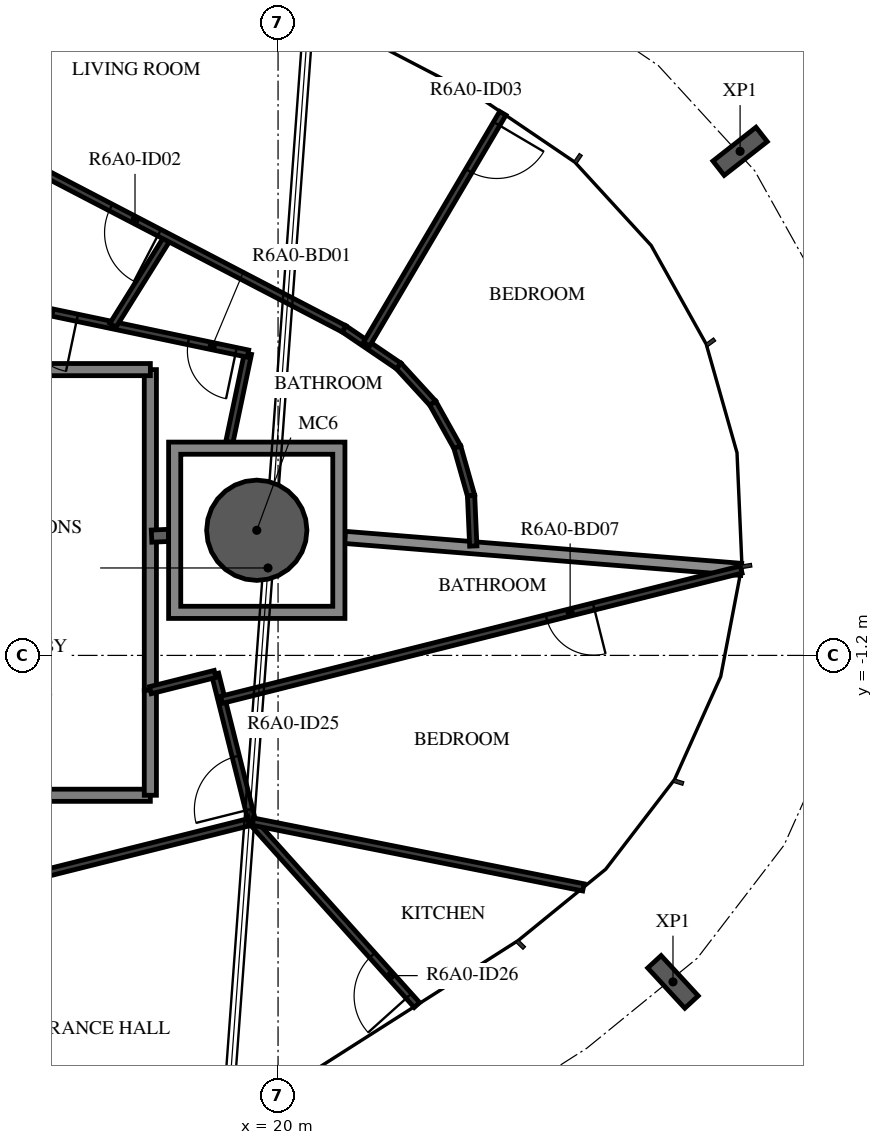
"""IFC4 building model, lengths in metres.
Left out: names, types, materials, properties, quantities, classifications, styles, units other than length and angle.
Written with IfcOpenShell. Run it as: python <this file> out.ifc"""

import sys

from ifc_helpers import new_model, si_unit, direction, frame, frame_2d, origin, origin_2d, place, context, subcontext, project, spatial, polyline, rectangle, hollow_circle, i_section, outline, extrude, element, fill, save


model = new_model("IFC4")
c1 = context("Model", 3, precision=1e-05, world=origin(), true_north=direction((0.0, 1.0)))
c2 = subcontext(c1, "Body", "Model", "MODEL_VIEW")
j1 = project(units=[si_unit("LENGTHUNIT", "METRE"), si_unit("PLANEANGLEUNIT", "RADIAN")], contexts=[c1])
p1 = place(None, origin())
s1 = spatial("IfcSite", under=j1, at=p1, CompositionType="ELEMENT")
p2 = place(p1, origin())
s2 = spatial("IfcBuilding", under=s1, at=p2, CompositionType="ELEMENT")
p3 = place(p2, frame((0.0, 0.0, 233.7)))
s3 = spatial("IfcBuildingStorey", under=s2, at=p3, CompositionType="ELEMENT", Elevation=233.7)
p4 = place(p3, frame((19.65, 0.858, -0.38), z_axis=(0.0, 0.0, 1.0), x_axis=(1.0, 0.0, 0.0)))
e1 = element("IfcColumn", 1, at=p4, inside=s3, PredefinedType="COLUMN", context=c2, shape_type="SweptSolid", body=[
    extrude(hollow_circle(Radius=0.825, WallThickness=0.04, at=origin_2d()), origin(), (0.0, 0.0, 1.0), 3.5),
])
for number, where, z_axis, x_axis in (
    (2, (26.495, -6.569, -0.38), (0.0, 0.0, 1.0), (-0.735, -0.678, 0.0)),
    (3, (27.598, 7.09, -0.38), (0.0, 0.0, 1.0), (0.617, -0.787, 0.0)),
):
    element("IfcColumn", number, at=place(p3, frame(where, z_axis=z_axis, x_axis=x_axis)), inside=s3, PredefinedType="COLUMN", context=c2, shape_type="SweptSolid", body=[
        extrude(i_section(OverallWidth=0.3, OverallDepth=0.9, WebThickness=0.019, FlangeThickness=0.035, FilletRadius=0.03, at=origin_2d()), origin(), (0.0, 0.0, 1.0), 3.5),
    ])
p5 = place(p3, frame((17.9, -1.772, 0.0), z_axis=(0.0, 0.0, 1.0), x_axis=(0.0, 1.0, 0.0)))
e4 = element("IfcWall", 4, at=p5, inside=s3, PredefinedType="STANDARD", context=c2, shape_type="SweptSolid", body=[
    extrude(rectangle(XDim=5.272, YDim=0.2, at=frame_2d((2.636, 0.0))), origin(), (0.0, 0.0, 1.0), 3.12),
])
p6 = place(p3, frame((17.9, 3.5, 0.0), z_axis=(0.0, 0.0, 1.0), x_axis=(-1.0, 0.0, 0.0)))
e5 = element("IfcWall", 5, at=p6, inside=s3, PredefinedType="STANDARD", context=c2, shape_type="SweptSolid", body=[
    extrude(rectangle(XDim=4.64, YDim=0.2, at=frame_2d((2.32, 0.0))), origin(), (0.0, 0.0, 1.0), 3.12),
])
p7 = place(p3, frame((13.285, -3.5, 0.0), z_axis=(0.0, 0.0, 1.0), x_axis=(1.0, 0.0, 0.0)))
e6 = element("IfcWall", 6, at=p7, inside=s3, PredefinedType="STANDARD", context=c2, shape_type="SweptSolid", body=[
    extrude(rectangle(XDim=4.615, YDim=0.2, at=frame_2d((2.308, 0.0))), origin(), (0.0, 0.0, 1.0), 3.12),
])
p8 = place(p3, frame((17.9, -3.5, 0.0), z_axis=(0.0, 0.0, 1.0), x_axis=(0.0, 1.0, 0.0)))
e7 = element("IfcWall", 7, at=p8, inside=s3, PredefinedType="STANDARD", context=c2, shape_type="SweptSolid", body=[
    extrude(rectangle(XDim=1.728, YDim=0.2, at=frame_2d((0.864, 0.0))), origin(), (0.0, 0.0, 1.0), 3.12),
])
p9 = place(p3, frame((17.92, 0.761, 0.0), z_axis=(0.0, 0.0, 1.0), x_axis=(0.999051221661, 0.04355061995, 0.0)))
e8 = element("IfcWall", 8, at=p9, inside=s3, PredefinedType="STANDARD", context=c2, shape_type="SweptSolid", body=[
    extrude(rectangle(XDim=0.28, YDim=0.2, at=frame_2d((0.14, 0.0))), origin(), (0.0, 0.0, 1.0), 3.12),
])
p10 = place(p3, frame((21.1, 0.741, 0.0), z_axis=(0.0, 0.0, 1.0), x_axis=(0.996750718609, -0.080548153006, 0.0)))
e9 = element("IfcWall", 9, at=p10, inside=s3, PredefinedType="STANDARD", context=c2, shape_type="SweptSolid", body=[
    extrude(rectangle(XDim=6.538, YDim=0.2, at=frame_2d((3.269, 0.0))), origin(), (0.0, 0.0, 1.0), 2.73),
])
p11 = place(p3, frame((19.199, 2.308, 0.0), z_axis=(0.0, 0.0, 1.0), x_axis=(0.205580140246, 0.978640284239, 0.0)))
e10 = element("IfcWall", 10, at=p11, inside=s3, PredefinedType="PARTITIONING", context=c2, shape_type="SweptSolid", body=[
    extrude(rectangle(XDim=1.487, YDim=0.12, at=frame_2d((0.743, 0.0))), origin(), (0.0, 0.0, 1.0), 3.12),
])
p12 = place(p3, frame((19.505, 3.763, 0.0), z_axis=(0.0, 0.0, 1.0), x_axis=(-0.978660081285, 0.205485876157, 0.0)))
e11 = element("IfcWall", 11, at=p12, inside=s3, PredefinedType="PARTITIONING", context=c2, shape_type="SweptSolid", body=[
    extrude(rectangle(XDim=4.996, YDim=0.12, at=frame_2d((2.498, 0.0))), origin(), (0.0, 0.0, 1.0), 3.12),
])
p13 = place(p12, frame((0.2, 0.0, 0.0)))
e12 = element("IfcOpeningElement", 12, at=p13, cuts=e11, PredefinedType="OPENING", context=c2, shape_type="SweptSolid", body=[
    extrude(rectangle(XDim=0.8, YDim=2.1, at=frame_2d((0.4, 1.05))), frame((0.0, 0.07, 0.0), z_axis=(0.0, -1.0, 0.0), x_axis=(1.0, 0.0, 0.0)), (0.0, 0.0, 1.0), 0.14),
])
p14 = place(p12, frame((2.869, 0.0, 0.0)))
e13 = element("IfcOpeningElement", 13, at=p14, cuts=e11, PredefinedType="OPENING", context=c2, shape_type="SweptSolid", body=[
    extrude(rectangle(XDim=0.9, YDim=2.1, at=frame_2d((0.45, 1.05))), frame((0.0, 0.07, 0.0), z_axis=(0.0, -1.0, 0.0), x_axis=(1.0, 0.0, 0.0)), (0.0, 0.0, 1.0), 0.14),
])
p15 = place(p3, frame((21.085, 4.169, 0.0), z_axis=(0.0, 0.0, 1.0), x_axis=(0.827390024541, -0.561627765776, 0.0)))
e14 = element("IfcWall", 14, at=p15, inside=s3, PredefinedType="PARTITIONING", context=c2, shape_type="SweptSolid", body=[
    extrude(rectangle(XDim=1.087, YDim=0.12, at=frame_2d((0.543, 0.0))), origin(), (0.0, 0.0, 1.0), 3.12),
])
p16 = place(p3, frame((21.984, 3.559, 0.0), z_axis=(0.0, 0.0, 1.0), x_axis=(0.675497816835, -0.737361986715, 0.0)))
e15 = element("IfcWall", 15, at=p16, inside=s3, PredefinedType="PARTITIONING", context=c2, shape_type="SweptSolid", body=[
    extrude(rectangle(XDim=0.829, YDim=0.12, at=frame_2d((0.415, 0.0))), origin(), (0.0, 0.0, 1.0), 3.12),
])
p17 = place(p3, frame((22.544, 2.948, 0.0), z_axis=(0.0, 0.0, 1.0), x_axis=(0.487392269075, -0.873183128585, 0.0)))
e16 = element("IfcWall", 16, at=p17, inside=s3, PredefinedType="PARTITIONING", context=c2, shape_type="SweptSolid", body=[
    extrude(rectangle(XDim=0.829, YDim=0.12, at=frame_2d((0.415, 0.0))), origin(), (0.0, 0.0, 1.0), 3.12),
])
for number, where, z_axis, x_axis in (
    (17, (22.948, 2.224, 0.0), (0.0, 0.0, 1.0), (0.273, -0.962, 0.0)),
    (18, (23.174, 1.427, 0.0), (0.0, 0.0, 1.0), (0.044, -0.999, 0.0)),
):
    element("IfcWall", number, at=place(p3, frame(where, z_axis=z_axis, x_axis=x_axis)), inside=s3, PredefinedType="PARTITIONING", context=c2, shape_type="SweptSolid", body=[
        extrude(rectangle(XDim=0.829, YDim=0.12, at=frame_2d((0.415, 0.0))), origin(), (0.0, 0.0, 1.0), 3.12),
    ])
p18 = place(p3, frame((23.696, 7.715, 0.0), z_axis=(0.0, 0.0, 1.0), x_axis=(-0.508219920645, -0.861227329025, 0.0)))
e19 = element("IfcWall", 19, at=p18, inside=s3, PredefinedType="PARTITIONING", context=c2, shape_type="SweptSolid", body=[
    extrude(rectangle(XDim=4.409, YDim=0.12, at=frame_2d((2.205, 0.0))), origin(), (0.0, 0.0, 1.0), 3.12),
])
p19 = place(p18, frame((0.2, 0.0, 0.0)))
e20 = element("IfcOpeningElement", 20, at=p19, cuts=e19, PredefinedType="OPENING", context=c2, shape_type="SweptSolid", body=[
    extrude(rectangle(XDim=0.9, YDim=2.1, at=frame_2d((0.45, 1.05))), frame((0.0, 0.07, 0.0), z_axis=(0.0, -1.0, 0.0), x_axis=(1.0, 0.0, 0.0)), (0.0, 0.0, 1.0), 0.14),
])
p20 = place(p3, frame((18.189, 5.677, 0.0), z_axis=(0.0, 0.0, 1.0), x_axis=(-0.529639004581, -0.848223157445, 0.0)))
e21 = element("IfcWall", 21, at=p20, inside=s3, PredefinedType="PARTITIONING", context=c2, shape_type="SweptSolid", body=[
    extrude(rectangle(XDim=1.707, YDim=0.12, at=frame_2d((0.854, 0.0))), origin(), (0.0, 0.0, 1.0), 3.12),
])
p21 = place(p3, frame((21.085, 4.169, 0.0), z_axis=(0.0, 0.0, 1.0), x_axis=(-0.887017373034, 0.461736050071, 0.0)))
e22 = element("IfcWall", 22, at=p21, inside=s3, PredefinedType="PARTITIONING", context=c2, shape_type="SweptSolid", body=[
    extrude(rectangle(XDim=10.247, YDim=0.12, at=frame_2d((5.123, 0.0))), origin(), (0.0, 0.0, 1.0), 3.12),
])
p22 = place(p21, frame((3.425, 0.0, 0.0)))
e23 = element("IfcOpeningElement", 23, at=p22, cuts=e22, PredefinedType="OPENING", context=c2, shape_type="SweptSolid", body=[
    extrude(rectangle(XDim=0.9, YDim=2.1, at=frame_2d((0.45, 1.05))), frame((0.0, 0.07, 0.0), z_axis=(0.0, -1.0, 0.0), x_axis=(1.0, 0.0, 0.0)), (0.0, 0.0, 1.0), 0.14),
])
p23 = place(p3, frame((14.029, -5.32, 0.0), z_axis=(0.0, 0.0, 1.0), x_axis=(0.969999099814, 0.243108507378, 0.0)))
e24 = element("IfcWall", 24, at=p23, inside=s3, PredefinedType="PARTITIONING", context=c2, shape_type="SweptSolid", body=[
    extrude(rectangle(XDim=5.715, YDim=0.12, at=frame_2d((2.857, 0.0))), origin(), (0.0, 0.0, 1.0), 3.12),
])
p24 = place(p3, frame((19.573, -3.93, 0.0), z_axis=(0.0, 0.0, 1.0), x_axis=(-0.243155959183, 0.96998720585, 0.0)))
e25 = element("IfcWall", 25, at=p24, inside=s3, PredefinedType="PARTITIONING", context=c2, shape_type="SweptSolid", body=[
    extrude(rectangle(XDim=2.5, YDim=0.12, at=frame_2d((1.25, 0.0))), origin(), (0.0, 0.0, 1.0), 3.12),
])
p25 = place(p24, frame((0.2, 0.0, 0.0)))
e26 = element("IfcOpeningElement", 26, at=p25, cuts=e25, PredefinedType="OPENING", context=c2, shape_type="SweptSolid", body=[
    extrude(rectangle(XDim=0.9, YDim=2.1, at=frame_2d((0.45, 1.05))), frame((0.0, 0.07, 0.0), z_axis=(0.0, -1.0, 0.0), x_axis=(1.0, 0.0, 0.0)), (0.0, 0.0, 1.0), 0.14),
])
p26 = place(p3, frame((18.965, -1.505, 0.0), z_axis=(0.0, 0.0, 1.0), x_axis=(-0.969998406835, -0.243111272339, 0.0)))
e27 = element("IfcWall", 27, at=p26, inside=s3, PredefinedType="PARTITIONING", context=c2, shape_type="SweptSolid", body=[
    extrude(rectangle(XDim=1.098, YDim=0.12, at=frame_2d((0.549, 0.0))), origin(), (0.0, 0.0, 1.0), 3.12),
])
p27 = place(p3, frame((22.284, -6.949, 0.0), z_axis=(0.0, 0.0, 1.0), x_axis=(-0.668156639948, 0.744020634454, 0.0)))
e28 = element("IfcWall", 28, at=p27, inside=s3, PredefinedType="PARTITIONING", context=c2, shape_type="SweptSolid", body=[
    extrude(rectangle(XDim=4.058, YDim=0.12, at=frame_2d((2.029, 0.0))), origin(), (0.0, 0.0, 1.0), 3.12),
])
p28 = place(p27, frame((0.2, 0.0, 0.0)))
e29 = element("IfcOpeningElement", 29, at=p28, cuts=e28, PredefinedType="OPENING", context=c2, shape_type="SweptSolid", body=[
    extrude(rectangle(XDim=0.9, YDim=2.1, at=frame_2d((0.45, 1.05))), frame((0.0, 0.07, 0.0), z_axis=(0.0, -1.0, 0.0), x_axis=(1.0, 0.0, 0.0)), (0.0, 0.0, 1.0), 0.14),
])
p29 = place(p3, frame((25.021, -5.015, 0.0), z_axis=(0.0, 0.0, 1.0), x_axis=(-0.98075605246, 0.195237203328, 0.0)))
e30 = element("IfcWall", 30, at=p29, inside=s3, PredefinedType="PARTITIONING", context=c2, shape_type="SweptSolid", body=[
    extrude(rectangle(XDim=5.556, YDim=0.12, at=frame_2d((2.778, 0.0))), origin(), (0.0, 0.0, 1.0), 3.12),
])
p30 = place(p3, frame((27.616, 0.212, 0.0), z_axis=(0.0, 0.0, 1.0), x_axis=(-0.969995609005, -0.243122435227, 0.0)))
e31 = element("IfcWall", 31, at=p30, inside=s3, PredefinedType="PARTITIONING", context=c2, shape_type="SweptSolid", body=[
    extrude(rectangle(XDim=8.81, YDim=0.12, at=frame_2d((4.405, 0.0))), origin(), (0.0, 0.0, 1.0), 3.12),
])
p31 = place(p30, frame((2.5, 0.0, 0.0)))
e32 = element("IfcOpeningElement", 32, at=p31, cuts=e31, PredefinedType="OPENING", context=c2, shape_type="SweptSolid", body=[
    extrude(rectangle(XDim=0.8, YDim=2.1, at=frame_2d((0.4, 1.05))), frame((0.0, 0.07, 0.0), z_axis=(0.0, -1.0, 0.0), x_axis=(1.0, 0.0, 0.0)), (0.0, 0.0, 1.0), 0.14),
])
p32 = place(p3, origin())
e33 = element("IfcWall", 33, at=p32, inside=s3, PredefinedType="STANDARD", context=c2, shape_type="SweptSolid", body=[
    extrude(outline(polyline([(21.1, 2.308), (21.1, -0.592), (18.2, -0.592), (18.2, 2.308), (21.1, 2.308)]), holes=[polyline([(18.4, -0.392), (20.9, -0.392), (20.9, 2.108), (18.4, 2.108), (18.4, -0.392)])]), origin(), (0.0, 0.0, 1.0), 3.12),
])
p33 = place(p13, origin())
e34 = element("IfcDoor", 34, at=p33, inside=s3, OperationType="SINGLE_SWING_LEFT", PredefinedType="DOOR", context=c2, shape_type="SweptSolid", body=[
    extrude(rectangle(XDim=0.8, YDim=2.1, at=frame_2d((0.4, 1.05))), frame((0.0, 0.025, 0.0), z_axis=(0.0, -1.0, 0.0), x_axis=(1.0, 0.0, 0.0)), (0.0, 0.0, 1.0), 0.05),
])
fill(e12, e34)
p34 = place(p14, origin())
e35 = element("IfcDoor", 35, at=p34, inside=s3, OperationType="SINGLE_SWING_LEFT", PredefinedType="DOOR", context=c2, shape_type="SweptSolid", body=[
    extrude(rectangle(XDim=0.9, YDim=2.1, at=frame_2d((0.45, 1.05))), frame((0.0, 0.025, 0.0), z_axis=(0.0, -1.0, 0.0), x_axis=(1.0, 0.0, 0.0)), (0.0, 0.0, 1.0), 0.05),
])
fill(e13, e35)
p35 = place(p22, origin())
e36 = element("IfcDoor", 36, at=p35, inside=s3, OperationType="SINGLE_SWING_LEFT", PredefinedType="DOOR", context=c2, shape_type="SweptSolid", body=[
    extrude(rectangle(XDim=0.9, YDim=2.1, at=frame_2d((0.45, 1.05))), frame((0.0, 0.025, 0.0), z_axis=(0.0, -1.0, 0.0), x_axis=(1.0, 0.0, 0.0)), (0.0, 0.0, 1.0), 0.05),
])
fill(e23, e36)
p36 = place(p19, origin())
e37 = element("IfcDoor", 37, at=p36, inside=s3, OperationType="SINGLE_SWING_LEFT", PredefinedType="DOOR", context=c2, shape_type="SweptSolid", body=[
    extrude(rectangle(XDim=0.9, YDim=2.1, at=frame_2d((0.45, 1.05))), frame((0.0, 0.025, 0.0), z_axis=(0.0, -1.0, 0.0), x_axis=(1.0, 0.0, 0.0)), (0.0, 0.0, 1.0), 0.05),
])
fill(e20, e37)
p37 = place(p25, origin())
e38 = element("IfcDoor", 38, at=p37, inside=s3, OperationType="SINGLE_SWING_RIGHT", PredefinedType="DOOR", context=c2, shape_type="SweptSolid", body=[
    extrude(rectangle(XDim=0.9, YDim=2.1, at=frame_2d((0.45, 1.05))), frame((0.0, 0.025, 0.0), z_axis=(0.0, -1.0, 0.0), x_axis=(1.0, 0.0, 0.0)), (0.0, 0.0, 1.0), 0.05),
])
fill(e26, e38)
p38 = place(p28, origin())
e39 = element("IfcDoor", 39, at=p38, inside=s3, OperationType="SINGLE_SWING_RIGHT", PredefinedType="DOOR", context=c2, shape_type="SweptSolid", body=[
    extrude(rectangle(XDim=0.9, YDim=2.1, at=frame_2d((0.45, 1.05))), frame((0.0, 0.025, 0.0), z_axis=(0.0, -1.0, 0.0), x_axis=(1.0, 0.0, 0.0)), (0.0, 0.0, 1.0), 0.05),
])
fill(e29, e39)
p39 = place(p31, origin())
e40 = element("IfcDoor", 40, at=p39, inside=s3, OperationType="SINGLE_SWING_RIGHT", PredefinedType="DOOR", context=c2, shape_type="SweptSolid", body=[
    extrude(rectangle(XDim=0.8, YDim=2.1, at=frame_2d((0.4, 1.05))), frame((0.0, 0.025, 0.0), z_axis=(0.0, -1.0, 0.0), x_axis=(1.0, 0.0, 0.0)), (0.0, 0.0, 1.0), 0.05),
])
fill(e32, e40)
save(model, sys.argv[1])
